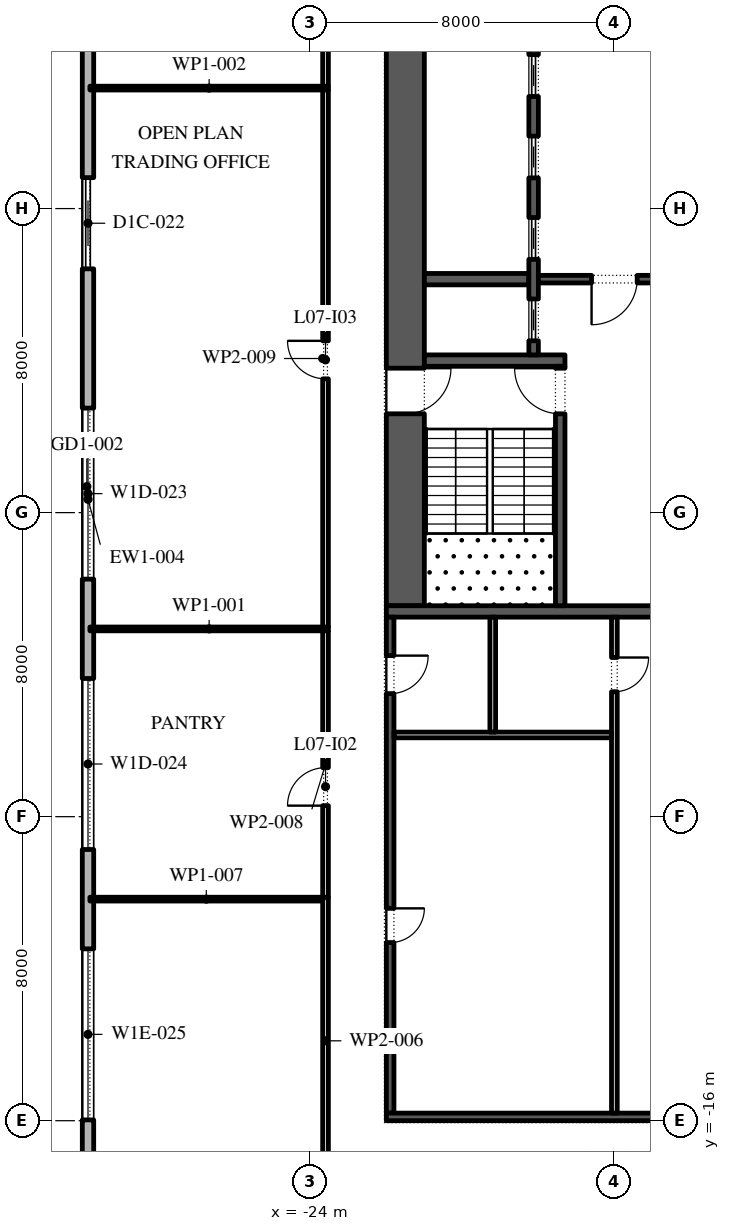
"""IFC4 building model, lengths in metres.
Left out: names, types, materials, properties, quantities, classifications, styles, units other than length and angle.
Written with IfcOpenShell. Run it as: python <this file> out.ifc"""

import sys

from ifc_helpers import new_model, si_unit, direction, frame, frame_2d, origin, place, context, subcontext, project, spatial, rectangle, extrude, element, fill, save


model = new_model("IFC4")
c1 = context("Model", 3, precision=1e-05, world=origin(), true_north=direction((0.0, 1.0)))
c2 = subcontext(c1, "Body", "Model", "MODEL_VIEW")
j1 = project(units=[si_unit("LENGTHUNIT", "METRE"), si_unit("PLANEANGLEUNIT", "RADIAN")], contexts=[c1])
p1 = place(None, origin())
s1 = spatial("IfcSite", under=j1, at=p1, CompositionType="ELEMENT")
p2 = place(p1, origin())
s2 = spatial("IfcBuilding", under=s1, at=p2, CompositionType="ELEMENT")
p3 = place(p2, frame((0.0, 0.0, 39.6)))
s3 = spatial("IfcBuildingStorey", under=s2, at=p3, CompositionType="ELEMENT", Elevation=39.6)
p4 = place(p3, frame((-29.85, 25.1, 0.0), z_axis=(0.0, 0.0, 1.0), x_axis=(0.0, -1.0, 0.0)))
e1 = element("IfcWall", 1, at=p4, inside=s3, PredefinedType="STANDARD", context=c2, shape_type="SweptSolid", body=[
    extrude(rectangle(XDim=49.5, YDim=0.3, at=frame_2d((24.75, 0.0))), origin(), (0.0, 0.0, 1.0), 4.0),
])
p5 = place(p4, frame((1.157, 0.0, 0.45)))
e2 = element("IfcOpeningElement", 2, at=p5, cuts=e1, PredefinedType="OPENING", context=c2, shape_type="SweptSolid", body=[
    extrude(rectangle(XDim=4.5, YDim=2.875, at=frame_2d((2.25, 1.438))), frame((0.0, 0.16, 0.0), z_axis=(0.0, -1.0, 0.0), x_axis=(1.0, 0.0, 0.0)), (0.0, 0.0, 1.0), 0.32),
])
p6 = place(p4, frame((8.121, 0.0, 0.45)))
e3 = element("IfcOpeningElement", 3, at=p6, cuts=e1, PredefinedType="OPENING", context=c2, shape_type="SweptSolid", body=[
    extrude(rectangle(XDim=4.5, YDim=3.05, at=frame_2d((2.25, 1.525))), frame((0.0, 0.16, 0.0), z_axis=(0.0, -1.0, 0.0), x_axis=(1.0, 0.0, 0.0)), (0.0, 0.0, 1.0), 0.32),
])
p7 = place(p4, frame((16.286, 0.0, 0.0)))
e4 = element("IfcOpeningElement", 4, at=p7, cuts=e1, PredefinedType="OPENING", context=c2, shape_type="SweptSolid", body=[
    extrude(rectangle(XDim=2.4, YDim=3.325, at=frame_2d((1.2, 1.663))), frame((0.0, 0.16, 0.0), z_axis=(0.0, -1.0, 0.0), x_axis=(1.0, 0.0, 0.0)), (0.0, 0.0, 1.0), 0.32),
])
p8 = place(p4, frame((22.35, 0.0, 0.45)))
e5 = element("IfcOpeningElement", 5, at=p8, cuts=e1, PredefinedType="OPENING", context=c2, shape_type="SweptSolid", body=[
    extrude(rectangle(XDim=4.5, YDim=2.875, at=frame_2d((2.25, 1.438))), frame((0.0, 0.16, 0.0), z_axis=(0.0, -1.0, 0.0), x_axis=(1.0, 0.0, 0.0)), (0.0, 0.0, 1.0), 0.32),
])
p9 = place(p4, frame((29.464, 0.0, 0.45)))
e6 = element("IfcOpeningElement", 6, at=p9, cuts=e1, PredefinedType="OPENING", context=c2, shape_type="SweptSolid", body=[
    extrude(rectangle(XDim=4.5, YDim=2.875, at=frame_2d((2.25, 1.438))), frame((0.0, 0.16, 0.0), z_axis=(0.0, -1.0, 0.0), x_axis=(1.0, 0.0, 0.0)), (0.0, 0.0, 1.0), 0.32),
])
p10 = place(p4, frame((36.579, 0.0, 0.45)))
e7 = element("IfcOpeningElement", 7, at=p10, cuts=e1, PredefinedType="OPENING", context=c2, shape_type="SweptSolid", body=[
    extrude(rectangle(XDim=4.5, YDim=2.825, at=frame_2d((2.25, 1.413))), frame((0.0, 0.16, 0.0), z_axis=(0.0, -1.0, 0.0), x_axis=(1.0, 0.0, 0.0)), (0.0, 0.0, 1.0), 0.32),
])
p11 = place(p4, frame((44.743, 0.0, 0.0)))
e8 = element("IfcOpeningElement", 8, at=p11, cuts=e1, PredefinedType="OPENING", context=c2, shape_type="SweptSolid", body=[
    extrude(rectangle(XDim=2.4, YDim=3.5, at=frame_2d((1.2, 1.75))), frame((0.0, 0.16, 0.0), z_axis=(0.0, -1.0, 0.0), x_axis=(1.0, 0.0, 0.0)), (0.0, 0.0, 1.0), 0.32),
])
p12 = place(p3, frame((-21.5, -2.45, 0.0), z_axis=(0.0, 0.0, 1.0), x_axis=(0.0, 1.0, 0.0)))
e9 = element("IfcWall", 9, at=p12, inside=s3, PredefinedType="SHEAR", context=c2, shape_type="SweptSolid", body=[
    extrude(rectangle(XDim=27.9, YDim=1.0, at=frame_2d((13.95, 0.0))), origin(), (0.0, 0.0, 1.0), 4.0),
])
p13 = place(p12, frame((5.05, 0.0, 0.0)))
e10 = element("IfcOpeningElement", 10, at=p13, cuts=e9, PredefinedType="OPENING", context=c2, shape_type="SweptSolid", body=[
    extrude(rectangle(XDim=1.2, YDim=2.1, at=frame_2d((0.6, 1.05))), frame((0.0, 0.51, 0.0), z_axis=(0.0, -1.0, 0.0), x_axis=(1.0, 0.0, 0.0)), (0.0, 0.0, 1.0), 1.02),
])
p14 = place(p12, frame((21.65, 0.0, 0.0)))
e11 = element("IfcOpeningElement", 11, at=p14, cuts=e9, PredefinedType="OPENING", context=c2, shape_type="SweptSolid", body=[
    extrude(rectangle(XDim=1.2, YDim=2.1, at=frame_2d((0.6, 1.05))), frame((0.0, 0.51, 0.0), z_axis=(0.0, -1.0, 0.0), x_axis=(1.0, 0.0, 0.0)), (0.0, 0.0, 1.0), 1.02),
])
p15 = place(p3, frame((-22.0, -2.6, 0.0), z_axis=(0.0, 0.0, 1.0), x_axis=(1.0, 0.0, 0.0)))
e12 = element("IfcWall", 12, at=p15, inside=s3, PredefinedType="SHEAR", context=c2, shape_type="SweptSolid", body=[
    extrude(rectangle(XDim=12.0, YDim=0.3, at=frame_2d((6.0, 0.0))), origin(), (0.0, 0.0, 1.0), 4.0),
])
p16 = place(p3, frame((-21.0, 4.0, 0.0), z_axis=(0.0, 0.0, 1.0), x_axis=(1.0, 0.0, 0.0)))
e13 = element("IfcWall", 13, at=p16, inside=s3, PredefinedType="SHEAR", context=c2, shape_type="SweptSolid", body=[
    extrude(rectangle(XDim=3.7, YDim=0.3, at=frame_2d((1.85, 0.0))), origin(), (0.0, 0.0, 1.0), 4.0),
])
p17 = place(p3, frame((-17.425, -2.45, 0.0), z_axis=(0.0, 0.0, 1.0), x_axis=(0.0, 1.0, 0.0)))
e14 = element("IfcWall", 14, at=p17, inside=s3, PredefinedType="SHEAR", context=c2, shape_type="SweptSolid", body=[
    extrude(rectangle(XDim=6.3, YDim=0.25, at=frame_2d((3.15, 0.0))), origin(), (0.0, 0.0, 1.0), 4.0),
])
p18 = place(p17, frame((5.05, 0.0, 0.0)))
e15 = element("IfcOpeningElement", 15, at=p18, cuts=e14, PredefinedType="OPENING", context=c2, shape_type="SweptSolid", body=[
    extrude(rectangle(XDim=1.2, YDim=2.1, at=frame_2d((0.6, 1.05))), frame((0.0, 0.135, 0.0), z_axis=(0.0, -1.0, 0.0), x_axis=(1.0, 0.0, 0.0)), (0.0, 0.0, 1.0), 0.27),
])
p19 = place(p3, frame((-21.0, 6.143, 0.0), z_axis=(0.0, 0.0, 1.0), x_axis=(1.0, 0.0, 0.0)))
e16 = element("IfcWall", 16, at=p19, inside=s3, PredefinedType="SHEAR", context=c2, shape_type="SweptSolid", body=[
    extrude(rectangle(XDim=2.75, YDim=0.3, at=frame_2d((1.375, 0.0))), origin(), (0.0, 0.0, 1.0), 4.0),
])
p20 = place(p3, frame((-18.125, 4.15, 0.0), z_axis=(0.0, 0.0, 1.0), x_axis=(0.0, 1.0, 0.0)))
e17 = element("IfcWall", 17, at=p20, inside=s3, PredefinedType="SHEAR", context=c2, shape_type="SweptSolid", body=[
    extrude(rectangle(XDim=14.7, YDim=0.25, at=frame_2d((7.35, 0.0))), origin(), (0.0, 0.0, 1.0), 4.0),
])
p21 = place(p20, frame((0.371, 0.0, 0.0)))
e18 = element("IfcOpeningElement", 18, at=p21, cuts=e17, PredefinedType="OPENING", context=c2, shape_type="SweptSolid", body=[
    extrude(rectangle(XDim=1.1, YDim=2.1, at=frame_2d((0.55, 1.05))), frame((0.0, 0.135, 0.0), z_axis=(0.0, -1.0, 0.0), x_axis=(1.0, 0.0, 0.0)), (0.0, 0.0, 1.0), 0.27),
])
p22 = place(p20, frame((2.514, 0.0, 0.0)))
e19 = element("IfcOpeningElement", 19, at=p22, cuts=e17, PredefinedType="OPENING", context=c2, shape_type="SweptSolid", body=[
    extrude(rectangle(XDim=1.1, YDim=2.1, at=frame_2d((0.55, 1.05))), frame((0.0, 0.135, 0.0), z_axis=(0.0, -1.0, 0.0), x_axis=(1.0, 0.0, 0.0)), (0.0, 0.0, 1.0), 0.27),
])
p23 = place(p20, frame((4.657, 0.0, 0.0)))
e20 = element("IfcOpeningElement", 20, at=p23, cuts=e17, PredefinedType="OPENING", context=c2, shape_type="SweptSolid", body=[
    extrude(rectangle(XDim=1.1, YDim=2.1, at=frame_2d((0.55, 1.05))), frame((0.0, 0.135, 0.0), z_axis=(0.0, -1.0, 0.0), x_axis=(1.0, 0.0, 0.0)), (0.0, 0.0, 1.0), 0.27),
])
p24 = place(p20, frame((6.8, 0.0, 0.0)))
e21 = element("IfcOpeningElement", 21, at=p24, cuts=e17, PredefinedType="OPENING", context=c2, shape_type="SweptSolid", body=[
    extrude(rectangle(XDim=1.1, YDim=2.1, at=frame_2d((0.55, 1.05))), frame((0.0, 0.135, 0.0), z_axis=(0.0, -1.0, 0.0), x_axis=(1.0, 0.0, 0.0)), (0.0, 0.0, 1.0), 0.27),
])
p25 = place(p20, frame((8.943, 0.0, 0.0)))
e22 = element("IfcOpeningElement", 22, at=p25, cuts=e17, PredefinedType="OPENING", context=c2, shape_type="SweptSolid", body=[
    extrude(rectangle(XDim=1.1, YDim=2.1, at=frame_2d((0.55, 1.05))), frame((0.0, 0.135, 0.0), z_axis=(0.0, -1.0, 0.0), x_axis=(1.0, 0.0, 0.0)), (0.0, 0.0, 1.0), 0.27),
])
p26 = place(p20, frame((11.086, 0.0, 0.0)))
e23 = element("IfcOpeningElement", 23, at=p26, cuts=e17, PredefinedType="OPENING", context=c2, shape_type="SweptSolid", body=[
    extrude(rectangle(XDim=1.1, YDim=2.1, at=frame_2d((0.55, 1.05))), frame((0.0, 0.135, 0.0), z_axis=(0.0, -1.0, 0.0), x_axis=(1.0, 0.0, 0.0)), (0.0, 0.0, 1.0), 0.27),
])
p27 = place(p20, frame((13.229, 0.0, 0.0)))
e24 = element("IfcOpeningElement", 24, at=p27, cuts=e17, PredefinedType="OPENING", context=c2, shape_type="SweptSolid", body=[
    extrude(rectangle(XDim=1.1, YDim=2.1, at=frame_2d((0.55, 1.05))), frame((0.0, 0.135, 0.0), z_axis=(0.0, -1.0, 0.0), x_axis=(1.0, 0.0, 0.0)), (0.0, 0.0, 1.0), 0.27),
])
p28 = place(p3, frame((-18.0, 6.143, 0.0), z_axis=(0.0, 0.0, 1.0), x_axis=(1.0, 0.0, 0.0)))
e25 = element("IfcWall", 25, at=p28, inside=s3, PredefinedType="SHEAR", context=c2, shape_type="SweptSolid", body=[
    extrude(rectangle(XDim=4.0, YDim=0.2, at=frame_2d((2.0, 0.0))), origin(), (0.0, 0.0, 1.0), 4.0),
])
p29 = place(p28, frame((1.4, 0.0, 0.0)))
e26 = element("IfcOpeningElement", 26, at=p29, cuts=e25, PredefinedType="OPENING", context=c2, shape_type="SweptSolid", body=[
    extrude(rectangle(XDim=1.2, YDim=2.1, at=frame_2d((0.6, 1.05))), frame((0.0, 0.11, 0.0), z_axis=(0.0, -1.0, 0.0), x_axis=(1.0, 0.0, 0.0)), (0.0, 0.0, 1.0), 0.22),
])
p30 = place(p3, frame((-21.9, -15.8, 0.0), z_axis=(0.0, 0.0, 1.0), x_axis=(0.0, 1.0, 0.0)))
e27 = element("IfcWall", 27, at=p30, inside=s3, PredefinedType="SHEAR", context=c2, shape_type="SweptSolid", body=[
    extrude(rectangle(XDim=13.05, YDim=0.2, at=frame_2d((6.525, 0.0))), origin(), (0.0, 0.0, 1.0), 4.0),
])
p31 = place(p30, frame((4.488, 0.0, 0.0)))
e28 = element("IfcOpeningElement", 28, at=p31, cuts=e27, PredefinedType="OPENING", context=c2, shape_type="SweptSolid", body=[
    extrude(rectangle(XDim=0.9, YDim=2.1, at=frame_2d((0.45, 1.05))), frame((0.0, 0.11, 0.0), z_axis=(0.0, -1.0, 0.0), x_axis=(1.0, 0.0, 0.0)), (0.0, 0.0, 1.0), 0.22),
])
p32 = place(p30, frame((11.038, 0.0, 0.0)))
e29 = element("IfcOpeningElement", 29, at=p32, cuts=e27, PredefinedType="OPENING", context=c2, shape_type="SweptSolid", body=[
    extrude(rectangle(XDim=1.0, YDim=2.1, at=frame_2d((0.5, 1.05))), frame((0.0, 0.11, 0.0), z_axis=(0.0, -1.0, 0.0), x_axis=(1.0, 0.0, 0.0)), (0.0, 0.0, 1.0), 0.22),
])
p33 = place(p3, frame((-22.0, -15.9, 0.0), z_axis=(0.0, 0.0, 1.0), x_axis=(1.0, 0.0, 0.0)))
e30 = element("IfcWall", 30, at=p33, inside=s3, PredefinedType="SHEAR", context=c2, shape_type="SweptSolid", body=[
    extrude(rectangle(XDim=12.0, YDim=0.2, at=frame_2d((6.0, 0.0))), origin(), (0.0, 0.0, 1.0), 4.0),
])
p34 = place(p3, frame((-16.0, -15.8, 0.0), z_axis=(0.0, 0.0, 1.0), x_axis=(0.0, 1.0, 0.0)))
e31 = element("IfcWall", 31, at=p34, inside=s3, PredefinedType="PARTITIONING", context=c2, shape_type="SweptSolid", body=[
    extrude(rectangle(XDim=13.05, YDim=0.15, at=frame_2d((6.525, 0.0))), origin(), (0.0, 0.0, 1.0), 4.0),
])
p35 = place(p34, frame((11.087, 0.0, 0.0)))
e32 = element("IfcOpeningElement", 32, at=p35, cuts=e31, PredefinedType="OPENING", context=c2, shape_type="SweptSolid", body=[
    extrude(rectangle(XDim=0.9, YDim=2.1, at=frame_2d((0.45, 1.05))), frame((0.0, 0.085, 0.0), z_axis=(0.0, -1.0, 0.0), x_axis=(1.0, 0.0, 0.0)), (0.0, 0.0, 1.0), 0.17),
])
p36 = place(p3, frame((-21.8, -5.85, 0.0), z_axis=(0.0, 0.0, 1.0), x_axis=(1.0, 0.0, 0.0)))
e33 = element("IfcWall", 33, at=p36, inside=s3, PredefinedType="PARTITIONING", context=c2, shape_type="SweptSolid", body=[
    extrude(rectangle(XDim=5.725, YDim=0.15, at=frame_2d((2.863, 0.0))), origin(), (0.0, 0.0, 1.0), 4.0),
])
p37 = place(p3, frame((-19.2, -5.775, 0.0), z_axis=(0.0, 0.0, 1.0), x_axis=(0.0, 1.0, 0.0)))
e34 = element("IfcWall", 34, at=p37, inside=s3, PredefinedType="PARTITIONING", context=c2, shape_type="SweptSolid", body=[
    extrude(rectangle(XDim=3.025, YDim=0.15, at=frame_2d((1.512, 0.0))), origin(), (0.0, 0.0, 1.0), 4.0),
])
for number, where, z_axis, x_axis in (
    (35, (-29.8, -3.06, 0.0), (0.0, 0.0, 1.0), (1.0, 0.0, 0.0)),
    (36, (-29.8, 11.17, 0.0), (0.0, 0.0, 1.0), (1.0, 0.0, 0.0)),
):
    element("IfcWall", number, at=place(p3, frame(where, z_axis=z_axis, x_axis=x_axis)), inside=s3, PredefinedType="PARTITIONING", context=c2, shape_type="SweptSolid", body=[
        extrude(rectangle(XDim=6.275, YDim=0.1, at=frame_2d((3.138, 0.0))), origin(), (0.0, 0.0, 1.0), 4.0),
    ])
p38 = place(p3, frame((-23.6, -17.675, 0.0), z_axis=(0.0, 0.0, 1.0), x_axis=(0.0, 1.0, 0.0)))
e37 = element("IfcWall", 37, at=p38, inside=s3, PredefinedType="PARTITIONING", context=c2, shape_type="SweptSolid", body=[
    extrude(rectangle(XDim=7.555, YDim=0.15, at=frame_2d((3.777, 0.0))), origin(), (0.0, 0.0, 1.0), 4.0),
])
p39 = place(p3, frame((-23.675, -10.17, 0.0), z_axis=(0.0, 0.0, 1.0), x_axis=(-1.0, 0.0, 0.0)))
e38 = element("IfcWall", 38, at=p39, inside=s3, PredefinedType="PARTITIONING", context=c2, shape_type="SweptSolid", body=[
    extrude(rectangle(XDim=6.125, YDim=0.1, at=frame_2d((3.062, 0.0))), origin(), (0.0, 0.0, 1.0), 4.0),
])
p40 = place(p3, frame((-23.6, -10.12, 0.0), z_axis=(0.0, 0.0, 1.0), x_axis=(0.0, 1.0, 0.0)))
e39 = element("IfcWall", 39, at=p40, inside=s3, PredefinedType="PARTITIONING", context=c2, shape_type="SweptSolid", body=[
    extrude(rectangle(XDim=7.01, YDim=0.15, at=frame_2d((3.505, 0.0))), origin(), (0.0, 0.0, 1.0), 4.0),
])
p41 = place(p40, frame((2.41, 0.0, 0.0)))
e40 = element("IfcOpeningElement", 40, at=p41, cuts=e39, PredefinedType="OPENING", context=c2, shape_type="SweptSolid", body=[
    extrude(rectangle(XDim=1.0, YDim=2.1, at=frame_2d((0.5, 1.05))), frame((0.0, 0.085, 0.0), z_axis=(0.0, -1.0, 0.0), x_axis=(1.0, 0.0, 0.0)), (0.0, 0.0, 1.0), 0.17),
])
p42 = place(p3, frame((-23.6, -3.01, 0.0), z_axis=(0.0, 0.0, 1.0), x_axis=(0.0, 1.0, 0.0)))
e41 = element("IfcWall", 41, at=p42, inside=s3, PredefinedType="PARTITIONING", context=c2, shape_type="SweptSolid", body=[
    extrude(rectangle(XDim=14.13, YDim=0.15, at=frame_2d((7.065, 0.0))), origin(), (0.0, 0.0, 1.0), 4.0),
])
p43 = place(p42, frame((6.53, 0.0, 0.0)))
e42 = element("IfcOpeningElement", 42, at=p43, cuts=e41, PredefinedType="OPENING", context=c2, shape_type="SweptSolid", body=[
    extrude(rectangle(XDim=1.0, YDim=2.1, at=frame_2d((0.5, 1.05))), frame((0.0, 0.085, 0.0), z_axis=(0.0, -1.0, 0.0), x_axis=(1.0, 0.0, 0.0)), (0.0, 0.0, 1.0), 0.17),
])
p44 = place(p3, frame((-23.6, 11.22, 0.0), z_axis=(0.0, 0.0, 1.0), x_axis=(0.0, 1.0, 0.0)))
e43 = element("IfcWall", 43, at=p44, inside=s3, PredefinedType="PARTITIONING", context=c2, shape_type="SweptSolid", body=[
    extrude(rectangle(XDim=7.02, YDim=0.15, at=frame_2d((3.51, 0.0))), origin(), (0.0, 0.0, 1.0), 4.0),
])
p45 = place(p44, frame((4.42, 0.0, 0.0)))
e44 = element("IfcOpeningElement", 44, at=p45, cuts=e43, PredefinedType="OPENING", context=c2, shape_type="SweptSolid", body=[
    extrude(rectangle(XDim=1.0, YDim=2.1, at=frame_2d((0.5, 1.05))), frame((0.0, 0.085, 0.0), z_axis=(0.0, -1.0, 0.0), x_axis=(1.0, 0.0, 0.0)), (0.0, 0.0, 1.0), 0.17),
])
p46 = place(p7, origin())
e45 = element("IfcDoor", 45, at=p46, inside=s3, OperationType="DOUBLE_DOOR_SLIDING", PredefinedType="DOOR", context=c2, shape_type="SweptSolid", body=[
    extrude(rectangle(XDim=2.4, YDim=3.325, at=frame_2d((1.2, 1.663))), frame((0.0, 0.025, 0.0), z_axis=(0.0, -1.0, 0.0), x_axis=(1.0, 0.0, 0.0)), (0.0, 0.0, 1.0), 0.05),
])
fill(e4, e45)
p47 = place(p8, origin())
e46 = element("IfcWindow", 46, at=p47, inside=s3, PartitioningType="DOUBLE_PANEL_VERTICAL", PredefinedType="WINDOW", context=c2, shape_type="SweptSolid", body=[
    extrude(rectangle(XDim=4.5, YDim=2.875, at=frame_2d((2.25, 1.438))), frame((0.0, 0.03, 0.0), z_axis=(0.0, -1.0, 0.0), x_axis=(1.0, 0.0, 0.0)), (0.0, 0.0, 1.0), 0.06),
])
fill(e5, e46)
p48 = place(p9, origin())
e47 = element("IfcWindow", 47, at=p48, inside=s3, PartitioningType="DOUBLE_PANEL_VERTICAL", PredefinedType="WINDOW", context=c2, shape_type="SweptSolid", body=[
    extrude(rectangle(XDim=4.5, YDim=2.875, at=frame_2d((2.25, 1.438))), frame((0.0, 0.03, 0.0), z_axis=(0.0, -1.0, 0.0), x_axis=(1.0, 0.0, 0.0)), (0.0, 0.0, 1.0), 0.06),
])
fill(e6, e47)
p49 = place(p10, origin())
e48 = element("IfcWindow", 48, at=p49, inside=s3, PartitioningType="DOUBLE_PANEL_VERTICAL", PredefinedType="WINDOW", context=c2, shape_type="SweptSolid", body=[
    extrude(rectangle(XDim=4.5, YDim=2.825, at=frame_2d((2.25, 1.413))), frame((0.0, 0.03, 0.0), z_axis=(0.0, -1.0, 0.0), x_axis=(1.0, 0.0, 0.0)), (0.0, 0.0, 1.0), 0.06),
])
fill(e7, e48)
p50 = place(p21, origin())
e49 = element("IfcDoor", 49, at=p50, inside=s3, OperationType="SLIDING_TO_LEFT", PredefinedType="DOOR", context=c2, shape_type="SweptSolid", body=[
    extrude(rectangle(XDim=1.1, YDim=2.1, at=frame_2d((0.55, 1.05))), frame((0.0, 0.025, 0.0), z_axis=(0.0, -1.0, 0.0), x_axis=(1.0, 0.0, 0.0)), (0.0, 0.0, 1.0), 0.05),
])
fill(e18, e49)
p51 = place(p22, origin())
e50 = element("IfcDoor", 50, at=p51, inside=s3, OperationType="SLIDING_TO_LEFT", PredefinedType="DOOR", context=c2, shape_type="SweptSolid", body=[
    extrude(rectangle(XDim=1.1, YDim=2.1, at=frame_2d((0.55, 1.05))), frame((0.0, 0.025, 0.0), z_axis=(0.0, -1.0, 0.0), x_axis=(1.0, 0.0, 0.0)), (0.0, 0.0, 1.0), 0.05),
])
fill(e19, e50)
p52 = place(p23, origin())
e51 = element("IfcDoor", 51, at=p52, inside=s3, OperationType="SLIDING_TO_LEFT", PredefinedType="DOOR", context=c2, shape_type="SweptSolid", body=[
    extrude(rectangle(XDim=1.1, YDim=2.1, at=frame_2d((0.55, 1.05))), frame((0.0, 0.025, 0.0), z_axis=(0.0, -1.0, 0.0), x_axis=(1.0, 0.0, 0.0)), (0.0, 0.0, 1.0), 0.05),
])
fill(e20, e51)
p53 = place(p24, origin())
e52 = element("IfcDoor", 52, at=p53, inside=s3, OperationType="SLIDING_TO_LEFT", PredefinedType="DOOR", context=c2, shape_type="SweptSolid", body=[
    extrude(rectangle(XDim=1.1, YDim=2.1, at=frame_2d((0.55, 1.05))), frame((0.0, 0.025, 0.0), z_axis=(0.0, -1.0, 0.0), x_axis=(1.0, 0.0, 0.0)), (0.0, 0.0, 1.0), 0.05),
])
fill(e21, e52)
p54 = place(p29, frame((1.2, 0.0, 0.0), z_axis=(0.0, 0.0, 1.0), x_axis=(-1.0, 0.0, 0.0)))
e53 = element("IfcDoor", 53, at=p54, inside=s3, OperationType="SINGLE_SWING_LEFT", PredefinedType="DOOR", context=c2, shape_type="SweptSolid", body=[
    extrude(rectangle(XDim=1.2, YDim=2.1, at=frame_2d((0.6, 1.05))), frame((0.0, 0.025, 0.0), z_axis=(0.0, -1.0, 0.0), x_axis=(1.0, 0.0, 0.0)), (0.0, 0.0, 1.0), 0.05),
])
fill(e26, e53)
p55 = place(p18, origin())
e54 = element("IfcDoor", 54, at=p55, inside=s3, OperationType="SINGLE_SWING_LEFT", PredefinedType="DOOR", context=c2, shape_type="SweptSolid", body=[
    extrude(rectangle(XDim=1.2, YDim=2.1, at=frame_2d((0.6, 1.05))), frame((0.0, 0.025, 0.0), z_axis=(0.0, -1.0, 0.0), x_axis=(1.0, 0.0, 0.0)), (0.0, 0.0, 1.0), 0.05),
])
fill(e15, e54)
p56 = place(p13, frame((1.2, 0.0, 0.0), z_axis=(0.0, 0.0, 1.0), x_axis=(-1.0, 0.0, 0.0)))
e55 = element("IfcDoor", 55, at=p56, inside=s3, OperationType="SINGLE_SWING_RIGHT", PredefinedType="DOOR", context=c2, shape_type="SweptSolid", body=[
    extrude(rectangle(XDim=1.2, YDim=2.1, at=frame_2d((0.6, 1.05))), frame((0.0, 0.025, 0.0), z_axis=(0.0, -1.0, 0.0), x_axis=(1.0, 0.0, 0.0)), (0.0, 0.0, 1.0), 0.05),
])
fill(e10, e55)
p57 = place(p31, frame((0.9, -0.15, 0.0), z_axis=(0.0, 0.0, 1.0), x_axis=(-1.0, 0.0, 0.0)))
e56 = element("IfcDoor", 56, at=p57, inside=s3, OperationType="SINGLE_SWING_RIGHT", PredefinedType="DOOR", context=c2, shape_type="SweptSolid", body=[
    extrude(rectangle(XDim=0.9, YDim=2.1, at=frame_2d((0.45, 1.05))), frame((0.0, -0.05, 0.0), z_axis=(0.0, -1.0, 0.0), x_axis=(1.0, 0.0, 0.0)), (0.0, 0.0, 1.0), 0.05),
])
fill(e28, e56)
p58 = place(p32, frame((1.0, -0.15, 0.0), z_axis=(0.0, 0.0, 1.0), x_axis=(-1.0, 0.0, 0.0)))
e57 = element("IfcDoor", 57, at=p58, inside=s3, OperationType="SINGLE_SWING_RIGHT", PredefinedType="DOOR", context=c2, shape_type="SweptSolid", body=[
    extrude(rectangle(XDim=1.0, YDim=2.1, at=frame_2d((0.5, 1.05))), frame((0.0, -0.05, 0.0), z_axis=(0.0, -1.0, 0.0), x_axis=(1.0, 0.0, 0.0)), (0.0, 0.0, 1.0), 0.05),
])
fill(e29, e57)
p59 = place(p35, frame((0.9, 0.0, 0.0), z_axis=(0.0, 0.0, 1.0), x_axis=(-1.0, 0.0, 0.0)))
e58 = element("IfcDoor", 58, at=p59, inside=s3, OperationType="SINGLE_SWING_RIGHT", PredefinedType="DOOR", context=c2, shape_type="SweptSolid", body=[
    extrude(rectangle(XDim=0.9, YDim=2.1, at=frame_2d((0.45, 1.05))), frame((0.0, 0.025, 0.0), z_axis=(0.0, -1.0, 0.0), x_axis=(1.0, 0.0, 0.0)), (0.0, 0.0, 1.0), 0.05),
])
fill(e32, e58)
p60 = place(p41, origin())
e59 = element("IfcDoor", 59, at=p60, inside=s3, OperationType="SINGLE_SWING_RIGHT", PredefinedType="DOOR", context=c2, shape_type="SweptSolid", body=[
    extrude(rectangle(XDim=1.0, YDim=2.1, at=frame_2d((0.5, 1.05))), frame((0.0, 0.025, 0.0), z_axis=(0.0, -1.0, 0.0), x_axis=(1.0, 0.0, 0.0)), (0.0, 0.0, 1.0), 0.05),
])
fill(e40, e59)
p61 = place(p43, origin())
e60 = element("IfcDoor", 60, at=p61, inside=s3, OperationType="SINGLE_SWING_LEFT", PredefinedType="DOOR", context=c2, shape_type="SweptSolid", body=[
    extrude(rectangle(XDim=1.0, YDim=2.1, at=frame_2d((0.5, 1.05))), frame((0.0, 0.025, 0.0), z_axis=(0.0, -1.0, 0.0), x_axis=(1.0, 0.0, 0.0)), (0.0, 0.0, 1.0), 0.05),
])
fill(e42, e60)
save(model, sys.argv[1])
